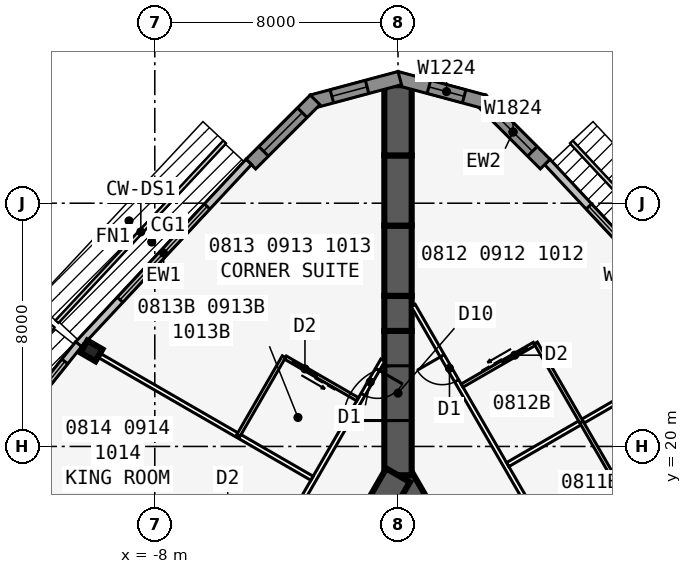
"""IFC4 building model, lengths in metres.
Left out: names, types, materials, properties, quantities, classifications, styles, units other than length and angle.
Written with IfcOpenShell. Run it as: python <this file> out.ifc"""

import sys

from ifc_helpers import new_model, si_unit, direction, frame, frame_2d, origin, origin_2d, place, context, subcontext, project, spatial, polyline, rectangle, i_section, outline, extrude, element, fill, save


model = new_model("IFC4")
c1 = context("Model", 3, precision=1e-05, world=origin(), true_north=direction((0.0, 1.0)))
c2 = subcontext(c1, "Body", "Model", "MODEL_VIEW")
j1 = project(units=[si_unit("LENGTHUNIT", "METRE"), si_unit("PLANEANGLEUNIT", "RADIAN")], contexts=[c1])
p1 = place(None, origin())
s1 = spatial("IfcSite", under=j1, at=p1, CompositionType="ELEMENT")
p2 = place(p1, origin())
s2 = spatial("IfcBuilding", under=s1, at=p2, CompositionType="ELEMENT")
p3 = place(p2, frame((0.0, 0.0, 38.7)))
s3 = spatial("IfcBuildingStorey", under=s2, at=p3, CompositionType="ELEMENT", Elevation=38.7)
p4 = place(p3, frame((16.5, -9.526, 0.0), z_axis=(0.0, 0.0, 1.0), x_axis=(-0.499999749417, 0.866025548458, 0.0)))
e1 = element("IfcWall", 1, at=p4, inside=s3, PredefinedType="SHEAR", context=c2, shape_type="SweptSolid", body=[
    extrude(rectangle(XDim=33.0, YDim=0.9, at=frame_2d((16.5, 0.0))), origin(), (0.0, 0.0, 1.0), 3.4),
])
p5 = place(p4, frame((14.15, 0.0, 0.0)))
e2 = element("IfcOpeningElement", 2, at=p5, cuts=e1, PredefinedType="OPENING", context=c2, shape_type="SweptSolid", body=[
    extrude(rectangle(XDim=1.8, YDim=2.13, at=frame_2d((0.9, 1.065))), frame((0.0, 0.46, 0.0), z_axis=(0.0, -1.0, 0.0), x_axis=(1.0, 0.0, 0.0)), (0.0, 0.0, 1.0), 0.92),
])
p6 = place(p4, frame((12.6, 0.0, 0.0)))
e3 = element("IfcOpeningElement", 3, at=p6, cuts=e1, PredefinedType="OPENING", context=c2, shape_type="SweptSolid", body=[
    extrude(rectangle(XDim=1.0, YDim=2.13, at=frame_2d((0.5, 1.065))), frame((0.0, 0.46, 0.0), z_axis=(0.0, -1.0, 0.0), x_axis=(1.0, 0.0, 0.0)), (0.0, 0.0, 1.0), 0.92),
])
p7 = place(p3, frame((0.0, 19.052, 0.0), z_axis=(0.0, 0.0, 1.0), x_axis=(-0.499999749417, -0.866025548458, 0.0)))
e4 = element("IfcWall", 4, at=p7, inside=s3, PredefinedType="SHEAR", context=c2, shape_type="SweptSolid", body=[
    extrude(rectangle(XDim=33.0, YDim=0.9, at=frame_2d((16.5, 0.0))), origin(), (0.0, 0.0, 1.0), 3.4),
])
p8 = place(p7, frame((14.15, 0.0, 0.0)))
e5 = element("IfcOpeningElement", 5, at=p8, cuts=e4, PredefinedType="OPENING", context=c2, shape_type="SweptSolid", body=[
    extrude(rectangle(XDim=1.8, YDim=2.13, at=frame_2d((0.9, 1.065))), frame((0.0, 0.46, 0.0), z_axis=(0.0, -1.0, 0.0), x_axis=(1.0, 0.0, 0.0)), (0.0, 0.0, 1.0), 0.92),
])
p9 = place(p7, frame((12.6, 0.0, 0.0)))
e6 = element("IfcOpeningElement", 6, at=p9, cuts=e4, PredefinedType="OPENING", context=c2, shape_type="SweptSolid", body=[
    extrude(rectangle(XDim=1.0, YDim=2.13, at=frame_2d((0.5, 1.065))), frame((0.0, 0.46, 0.0), z_axis=(0.0, -1.0, 0.0), x_axis=(1.0, 0.0, 0.0)), (0.0, 0.0, 1.0), 0.92),
])
p10 = place(p3, frame((0.0, 19.052, 0.0), z_axis=(0.0, 0.0, 1.0), x_axis=(0.0, 1.0, 0.0)))
e7 = element("IfcWall", 7, at=p10, inside=s3, PredefinedType="SHEAR", context=c2, shape_type="SweptSolid", body=[
    extrude(rectangle(XDim=4.746, YDim=0.9, at=frame_2d((2.373, 0.0))), origin(), (0.0, 0.0, 1.0), 3.4),
])
p11 = place(p10, frame((1.8, 0.0, 0.0)))
e8 = element("IfcOpeningElement", 8, at=p11, cuts=e7, PredefinedType="OPENING", context=c2, shape_type="SweptSolid", body=[
    extrude(rectangle(XDim=1.8, YDim=2.13, at=frame_2d((0.9, 1.065))), frame((0.0, 0.46, 0.0), z_axis=(0.0, -1.0, 0.0), x_axis=(1.0, 0.0, 0.0)), (0.0, 0.0, 1.0), 0.92),
])
p12 = place(p3, frame((0.0, 23.799, 0.0), z_axis=(0.0, 0.0, 1.0), x_axis=(0.0, 1.0, 0.0)))
e9 = element("IfcWall", 9, at=p12, inside=s3, PredefinedType="SHEAR", context=c2, shape_type="SweptSolid", body=[
    extrude(rectangle(XDim=1.155, YDim=0.9, at=frame_2d((0.577, 0.0))), origin(), (0.0, 0.0, 1.0), 3.4),
])
p13 = place(p3, frame((0.0, 24.953, 0.0), z_axis=(0.0, 0.0, 1.0), x_axis=(0.0, 1.0, 0.0)))
e10 = element("IfcWall", 10, at=p13, inside=s3, PredefinedType="SHEAR", context=c2, shape_type="SweptSolid", body=[
    extrude(rectangle(XDim=2.309, YDim=0.9, at=frame_2d((1.155, 0.0))), origin(), (0.0, 0.0, 1.0), 3.4),
])
p14 = place(p3, frame((0.0, 27.263, 0.0), z_axis=(0.0, 0.0, 1.0), x_axis=(0.0, 1.0, 0.0)))
e11 = element("IfcWall", 11, at=p14, inside=s3, PredefinedType="SHEAR", context=c2, shape_type="SweptSolid", body=[
    extrude(rectangle(XDim=2.31, YDim=0.9, at=frame_2d((1.155, 0.0))), origin(), (0.0, 0.0, 1.0), 3.4),
])
p15 = place(p3, frame((0.0, 29.572, 0.0), z_axis=(0.0, 0.0, 1.0), x_axis=(0.0, 1.0, 0.0)))
e12 = element("IfcWall", 12, at=p15, inside=s3, PredefinedType="SHEAR", context=c2, shape_type="SweptSolid", body=[
    extrude(rectangle(XDim=2.309, YDim=0.9, at=frame_2d((1.155, 0.0))), origin(), (0.0, 0.0, 1.0), 3.4),
])
p16 = place(p3, frame((-10.083, 23.142, 0.0), z_axis=(0.0, 0.0, 1.0), x_axis=(-0.5, -0.866025403784, 0.0)))
e13 = element("IfcColumn", 13, at=p16, inside=s3, PredefinedType="COLUMN", context=c2, shape_type="SweptSolid", body=[
    extrude(i_section(OverallWidth=0.455, OverallDepth=0.569, WebThickness=0.078, FlangeThickness=0.125, at=origin_2d()), origin(), (0.0, 0.0, 1.0), 3.4),
])
p17 = place(p3, frame((10.511, 23.357, 0.0), z_axis=(0.0, 0.0, 1.0), x_axis=(-0.682289646561, 0.731081964075, 0.0)))
e14 = element("IfcWall", 14, at=p17, inside=s3, PredefinedType="STANDARD", context=c2, shape_type="SweptSolid", body=[
    extrude(rectangle(XDim=8.211, YDim=0.25, at=frame_2d((4.105, 0.0))), origin(), (0.0, 0.0, 1.0), 3.235),
])
p18 = place(p17, frame((2.006, 0.0, 0.45)))
e15 = element("IfcOpeningElement", 15, at=p18, cuts=e14, PredefinedType="OPENING", context=c2, shape_type="SweptSolid", body=[
    extrude(rectangle(XDim=4.2, YDim=2.4, at=frame_2d((2.1, 1.2))), frame((0.0, 0.135, 0.0), z_axis=(0.0, -1.0, 0.0), x_axis=(1.0, 0.0, 0.0)), (0.0, 0.0, 1.0), 0.27),
])
p19 = place(p3, frame((4.841, 29.286, 0.0), z_axis=(0.0, 0.0, 1.0), x_axis=(-0.707106781187, 0.707106781187, 0.0)))
e16 = element("IfcWall", 16, at=p19, inside=s3, PredefinedType="SOLIDWALL", context=c2, shape_type="SweptSolid", body=[
    extrude(rectangle(XDim=2.988, YDim=0.45, at=frame_2d((1.494, 0.0))), origin(), (0.0, 0.0, 1.0), 3.235),
])
p20 = place(p19, frame((0.594, 0.0, 0.45)))
e17 = element("IfcOpeningElement", 17, at=p20, cuts=e16, PredefinedType="OPENING", context=c2, shape_type="SweptSolid", body=[
    extrude(rectangle(XDim=1.8, YDim=2.4, at=frame_2d((0.9, 1.2))), frame((0.0, 0.235, 0.0), z_axis=(0.0, -1.0, 0.0), x_axis=(1.0, 0.0, 0.0)), (0.0, 0.0, 1.0), 0.47),
])
p21 = place(p3, frame((2.829, 31.341, 0.0), z_axis=(0.0, 0.0, 1.0), x_axis=(-0.965930548995, 0.258801419081, 0.0)))
e18 = element("IfcWall", 18, at=p21, inside=s3, PredefinedType="SOLIDWALL", context=c2, shape_type="SweptSolid", body=[
    extrude(outline(polyline([(2.989, 0.225), (2.929, 0.225), (2.438, 0.093), (2.402, 0.225), (0.0, 0.225), (0.0, -0.225), (2.989, -0.225), (2.989, 0.225)])), origin(), (0.0, 0.0, 1.0), 3.235),
])
p22 = place(p21, frame((0.676, 0.0, 0.45)))
e19 = element("IfcOpeningElement", 19, at=p22, cuts=e18, PredefinedType="OPENING", context=c2, shape_type="SweptSolid", body=[
    extrude(rectangle(XDim=1.2, YDim=2.4, at=frame_2d((0.6, 1.2))), frame((0.0, 0.235, 0.0), z_axis=(0.0, -1.0, 0.0), x_axis=(1.0, 0.0, 0.0)), (0.0, 0.0, 1.0), 0.47),
])
p23 = place(p3, frame((0.058, 32.114, 0.0), z_axis=(0.0, 0.0, 1.0), x_axis=(-0.965930548995, -0.258801419081, 0.0)))
e20 = element("IfcWall", 20, at=p23, inside=s3, PredefinedType="SOLIDWALL", context=c2, shape_type="SweptSolid", body=[
    extrude(outline(polyline([(2.989, 0.225), (0.586, 0.225), (0.551, 0.093), (0.059, 0.225), (0.0, 0.225), (0.0, -0.225), (2.989, -0.225), (2.989, 0.225)])), origin(), (0.0, 0.0, 1.0), 3.235),
])
p24 = place(p23, frame((1.113, 0.0, 0.45)))
e21 = element("IfcOpeningElement", 21, at=p24, cuts=e20, PredefinedType="OPENING", context=c2, shape_type="SweptSolid", body=[
    extrude(rectangle(XDim=1.2, YDim=2.4, at=frame_2d((0.6, 1.2))), frame((0.0, 0.235, 0.0), z_axis=(0.0, -1.0, 0.0), x_axis=(1.0, 0.0, 0.0)), (0.0, 0.0, 1.0), 0.47),
])
p25 = place(p3, frame((-2.728, 31.399, 0.0), z_axis=(0.0, 0.0, 1.0), x_axis=(-0.707106781187, -0.707106781187, 0.0)))
e22 = element("IfcWall", 22, at=p25, inside=s3, PredefinedType="SOLIDWALL", context=c2, shape_type="SweptSolid", body=[
    extrude(rectangle(XDim=2.988, YDim=0.45, at=frame_2d((1.494, 0.0))), origin(), (0.0, 0.0, 1.0), 3.235),
])
p26 = place(p25, frame((0.594, 0.0, 0.45)))
e23 = element("IfcOpeningElement", 23, at=p26, cuts=e22, PredefinedType="OPENING", context=c2, shape_type="SweptSolid", body=[
    extrude(rectangle(XDim=1.8, YDim=2.4, at=frame_2d((0.9, 1.2))), frame((0.0, 0.235, 0.0), z_axis=(0.0, -1.0, 0.0), x_axis=(1.0, 0.0, 0.0)), (0.0, 0.0, 1.0), 0.47),
])
p27 = place(p3, frame((-4.909, 29.36, 0.0), z_axis=(0.0, 0.0, 1.0), x_axis=(-0.682289646561, -0.731081964075, 0.0)))
e24 = element("IfcWall", 24, at=p27, inside=s3, PredefinedType="STANDARD", context=c2, shape_type="SweptSolid", body=[
    extrude(rectangle(XDim=8.211, YDim=0.25, at=frame_2d((4.105, 0.0))), origin(), (0.0, 0.0, 1.0), 3.235),
])
p28 = place(p27, frame((2.006, 0.0, 0.45)))
e25 = element("IfcOpeningElement", 25, at=p28, cuts=e24, PredefinedType="OPENING", context=c2, shape_type="SweptSolid", body=[
    extrude(rectangle(XDim=4.2, YDim=2.4, at=frame_2d((2.1, 1.2))), frame((0.0, 0.135, 0.0), z_axis=(0.0, -1.0, 0.0), x_axis=(1.0, 0.0, 0.0)), (0.0, 0.0, 1.0), 0.27),
])
p29 = place(p3, frame((-10.505, 23.364, 0.0), z_axis=(0.0, 0.0, 1.0), x_axis=(-0.624594965756, -0.780948864364, 0.0)))
e26 = element("IfcWall", 26, at=p29, inside=s3, PredefinedType="STANDARD", context=c2, shape_type="SweptSolid", body=[
    extrude(rectangle(XDim=5.058, YDim=0.25, at=frame_2d((2.529, 0.0))), origin(), (0.0, 0.0, 1.0), 3.235),
])
p30 = place(p29, frame((0.729, 0.0, 0.45)))
e27 = element("IfcOpeningElement", 27, at=p30, cuts=e26, PredefinedType="OPENING", context=c2, shape_type="SweptSolid", body=[
    extrude(rectangle(XDim=3.6, YDim=2.4, at=frame_2d((1.8, 1.2))), frame((0.0, 0.135, 0.0), z_axis=(0.0, -1.0, 0.0), x_axis=(1.0, 0.0, 0.0)), (0.0, 0.0, 1.0), 0.27),
])
p31 = place(p3, frame((21.586, -11.885, 0.0), z_axis=(0.0, 0.0, 1.0), x_axis=(-0.500001915564, 0.86602429783, 0.0)))
e28 = element("IfcWall", 28, at=p31, inside=s3, PredefinedType="PARTITIONING", context=c2, shape_type="SweptSolid", body=[
    extrude(rectangle(XDim=42.172, YDim=0.15, at=frame_2d((21.086, 0.0))), origin(), (0.0, 0.0, 1.0), 3.235),
])
p32 = place(p31, frame((1.911, 0.0, 0.0)))
e29 = element("IfcOpeningElement", 29, at=p32, cuts=e28, PredefinedType="OPENING", context=c2, shape_type="SweptSolid", body=[
    extrude(rectangle(XDim=0.95, YDim=2.13, at=frame_2d((0.475, 1.065))), frame((0.0, 0.085, 0.0), z_axis=(0.0, -1.0, 0.0), x_axis=(1.0, 0.0, 0.0)), (0.0, 0.0, 1.0), 0.17),
])
p33 = place(p31, frame((7.511, 0.0, 0.0)))
e30 = element("IfcOpeningElement", 30, at=p33, cuts=e28, PredefinedType="OPENING", context=c2, shape_type="SweptSolid", body=[
    extrude(rectangle(XDim=0.95, YDim=2.13, at=frame_2d((0.475, 1.065))), frame((0.0, 0.085, 0.0), z_axis=(0.0, -1.0, 0.0), x_axis=(1.0, 0.0, 0.0)), (0.0, 0.0, 1.0), 0.17),
])
p34 = place(p31, frame((13.711, 0.0, 0.0)))
e31 = element("IfcOpeningElement", 31, at=p34, cuts=e28, PredefinedType="OPENING", context=c2, shape_type="SweptSolid", body=[
    extrude(rectangle(XDim=0.95, YDim=2.13, at=frame_2d((0.475, 1.065))), frame((0.0, 0.085, 0.0), z_axis=(0.0, -1.0, 0.0), x_axis=(1.0, 0.0, 0.0)), (0.0, 0.0, 1.0), 0.17),
])
p35 = place(p31, frame((21.911, 0.0, 0.0)))
e32 = element("IfcOpeningElement", 32, at=p35, cuts=e28, PredefinedType="OPENING", context=c2, shape_type="SweptSolid", body=[
    extrude(rectangle(XDim=0.95, YDim=2.13, at=frame_2d((0.475, 1.065))), frame((0.0, 0.085, 0.0), z_axis=(0.0, -1.0, 0.0), x_axis=(1.0, 0.0, 0.0)), (0.0, 0.0, 1.0), 0.17),
])
p36 = place(p31, frame((28.711, 0.0, 0.0)))
e33 = element("IfcOpeningElement", 33, at=p36, cuts=e28, PredefinedType="OPENING", context=c2, shape_type="SweptSolid", body=[
    extrude(rectangle(XDim=0.95, YDim=2.13, at=frame_2d((0.475, 1.065))), frame((0.0, 0.085, 0.0), z_axis=(0.0, -1.0, 0.0), x_axis=(1.0, 0.0, 0.0)), (0.0, 0.0, 1.0), 0.17),
])
p37 = place(p31, frame((31.911, 0.0, 0.0)))
e34 = element("IfcOpeningElement", 34, at=p37, cuts=e28, PredefinedType="OPENING", context=c2, shape_type="SweptSolid", body=[
    extrude(rectangle(XDim=0.95, YDim=2.13, at=frame_2d((0.475, 1.065))), frame((0.0, 0.085, 0.0), z_axis=(0.0, -1.0, 0.0), x_axis=(1.0, 0.0, 0.0)), (0.0, 0.0, 1.0), 0.17),
])
p38 = place(p31, frame((39.311, 0.0, 0.0)))
e35 = element("IfcOpeningElement", 35, at=p38, cuts=e28, PredefinedType="OPENING", context=c2, shape_type="SweptSolid", body=[
    extrude(rectangle(XDim=0.95, YDim=2.13, at=frame_2d((0.475, 1.065))), frame((0.0, 0.085, 0.0), z_axis=(0.0, -1.0, 0.0), x_axis=(1.0, 0.0, 0.0)), (0.0, 0.0, 1.0), 0.17),
])
p39 = place(p3, frame((6.108, 15.073, 0.0), z_axis=(0.0, 0.0, 1.0), x_axis=(0.866031196456, 0.499989966665, 0.0)))
e36 = element("IfcWall", 36, at=p39, inside=s3, PredefinedType="PARTITIONING", context=c2, shape_type="SweptSolid", body=[
    extrude(rectangle(XDim=8.585, YDim=0.15, at=frame_2d((4.292, 0.0))), origin(), (0.0, 0.0, 1.0), 2.389),
])
p40 = place(p3, frame((3.608, 19.404, 0.0), z_axis=(0.0, 0.0, 1.0), x_axis=(0.866021300503, 0.500007107024, 0.0)))
e37 = element("IfcWall", 37, at=p40, inside=s3, PredefinedType="PARTITIONING", context=c2, shape_type="SweptSolid", body=[
    extrude(rectangle(XDim=7.82, YDim=0.15, at=frame_2d((3.91, 0.0))), origin(), (0.0, 0.0, 1.0), 2.389),
])
for number, where, z_axis, x_axis in (
    (38, (7.533, 18.205, 0.0), (0.0, 0.0, 1.0), (-0.5, 0.866, 0.0)),
    (39, (6.033, 20.803, 0.0), (0.0, 0.0, 1.0), (-0.5, 0.866, 0.0)),
):
    element("IfcWall", number, at=place(p3, frame(where, z_axis=z_axis, x_axis=x_axis)), inside=s3, PredefinedType="PLUMBINGWALL", context=c2, shape_type="SweptSolid", body=[
        extrude(rectangle(XDim=3.0, YDim=0.12, at=frame_2d((1.5, 0.0))), origin(), (0.0, 0.0, 1.0), 3.235),
    ])
p41 = place(p3, frame((2.108, 22.002, 0.0), z_axis=(0.0, 0.0, 1.0), x_axis=(0.866035715982, 0.499982138324, 0.0)))
e40 = element("IfcWall", 40, at=p41, inside=s3, PredefinedType="PLUMBINGWALL", context=c2, shape_type="SweptSolid", body=[
    extrude(rectangle(XDim=2.74, YDim=0.12, at=frame_2d((1.37, 0.0))), origin(), (0.0, 0.0, 1.0), 3.235),
])
p42 = place(p41, frame((1.55, 0.0, 0.0)))
e41 = element("IfcOpeningElement", 41, at=p42, cuts=e40, PredefinedType="OPENING", context=c2, shape_type="SweptSolid", body=[
    extrude(rectangle(XDim=0.9, YDim=2.13, at=frame_2d((0.45, 1.065))), frame((0.0, 0.07, 0.0), z_axis=(0.0, -1.0, 0.0), x_axis=(1.0, 0.0, 0.0)), (0.0, 0.0, 1.0), 0.14),
])
p43 = place(p3, frame((-0.5, 22.836, 0.0), z_axis=(0.0, 0.0, 1.0), x_axis=(-0.500001677587, -0.866024435227, 0.0)))
e42 = element("IfcWall", 42, at=p43, inside=s3, PredefinedType="PARTITIONING", context=c2, shape_type="SweptSolid", body=[
    extrude(rectangle(XDim=39.054, YDim=0.15, at=frame_2d((19.527, 0.0))), origin(), (0.0, 0.0, 1.0), 3.235),
])
p44 = place(p43, frame((0.352, 0.0, 0.0)))
e43 = element("IfcOpeningElement", 43, at=p44, cuts=e42, PredefinedType="OPENING", context=c2, shape_type="SweptSolid", body=[
    extrude(rectangle(XDim=0.95, YDim=2.13, at=frame_2d((0.475, 1.065))), frame((0.0, 0.085, 0.0), z_axis=(0.0, -1.0, 0.0), x_axis=(1.0, 0.0, 0.0)), (0.0, 0.0, 1.0), 0.17),
])
p45 = place(p43, frame((5.952, 0.0, 0.0)))
e44 = element("IfcOpeningElement", 44, at=p45, cuts=e42, PredefinedType="OPENING", context=c2, shape_type="SweptSolid", body=[
    extrude(rectangle(XDim=0.95, YDim=2.13, at=frame_2d((0.475, 1.065))), frame((0.0, 0.085, 0.0), z_axis=(0.0, -1.0, 0.0), x_axis=(1.0, 0.0, 0.0)), (0.0, 0.0, 1.0), 0.17),
])
p46 = place(p43, frame((11.552, 0.0, 0.0)))
e45 = element("IfcOpeningElement", 45, at=p46, cuts=e42, PredefinedType="OPENING", context=c2, shape_type="SweptSolid", body=[
    extrude(rectangle(XDim=0.95, YDim=2.13, at=frame_2d((0.475, 1.065))), frame((0.0, 0.085, 0.0), z_axis=(0.0, -1.0, 0.0), x_axis=(1.0, 0.0, 0.0)), (0.0, 0.0, 1.0), 0.17),
])
p47 = place(p43, frame((21.552, 0.0, 0.0)))
e46 = element("IfcOpeningElement", 46, at=p47, cuts=e42, PredefinedType="OPENING", context=c2, shape_type="SweptSolid", body=[
    extrude(rectangle(XDim=0.95, YDim=2.13, at=frame_2d((0.475, 1.065))), frame((0.0, 0.085, 0.0), z_axis=(0.0, -1.0, 0.0), x_axis=(1.0, 0.0, 0.0)), (0.0, 0.0, 1.0), 0.17),
])
p48 = place(p43, frame((30.952, 0.0, 0.0)))
e47 = element("IfcOpeningElement", 47, at=p48, cuts=e42, PredefinedType="OPENING", context=c2, shape_type="SweptSolid", body=[
    extrude(rectangle(XDim=0.95, YDim=2.13, at=frame_2d((0.475, 1.065))), frame((0.0, 0.085, 0.0), z_axis=(0.0, -1.0, 0.0), x_axis=(1.0, 0.0, 0.0)), (0.0, 0.0, 1.0), 0.17),
])
p49 = place(p43, frame((37.752, 0.0, 0.0)))
e48 = element("IfcOpeningElement", 48, at=p49, cuts=e42, PredefinedType="OPENING", context=c2, shape_type="SweptSolid", body=[
    extrude(rectangle(XDim=0.95, YDim=2.13, at=frame_2d((0.475, 1.065))), frame((0.0, 0.085, 0.0), z_axis=(0.0, -1.0, 0.0), x_axis=(1.0, 0.0, 0.0)), (0.0, 0.0, 1.0), 0.17),
])
p50 = place(p3, frame((-2.829, 18.954, 0.0), z_axis=(0.0, 0.0, 1.0), x_axis=(-0.866020536561, 0.500008430184, 0.0)))
e49 = element("IfcWall", 49, at=p50, inside=s3, PredefinedType="PARTITIONING", context=c2, shape_type="SweptSolid", body=[
    extrude(rectangle(XDim=8.72, YDim=0.15, at=frame_2d((4.36, 0.0))), origin(), (0.0, 0.0, 1.0), 2.389),
])
p51 = place(p3, frame((-5.329, 14.623, 0.0), z_axis=(0.0, 0.0, 1.0), x_axis=(-0.866018409083, 0.500012114982, 0.0)))
e50 = element("IfcWall", 50, at=p51, inside=s3, PredefinedType="PARTITIONING", context=c2, shape_type="SweptSolid", body=[
    extrude(rectangle(XDim=9.485, YDim=0.15, at=frame_2d((4.742, 0.0))), origin(), (0.0, 0.0, 1.0), 2.389),
])
p52 = place(p3, frame((-3.753, 22.952, 0.0), z_axis=(0.0, 0.0, 1.0), x_axis=(-0.499990139034, -0.866031096941, 0.0)))
e51 = element("IfcWall", 51, at=p52, inside=s3, PredefinedType="PLUMBINGWALL", context=c2, shape_type="SweptSolid", body=[
    extrude(rectangle(XDim=3.0, YDim=0.12, at=frame_2d((1.5, 0.0))), origin(), (0.0, 0.0, 1.0), 3.235),
])
p53 = place(p3, frame((-1.329, 21.552, 0.0), z_axis=(0.0, 0.0, 1.0), x_axis=(-0.865997131366, 0.500048966069, 0.0)))
e52 = element("IfcWall", 52, at=p53, inside=s3, PredefinedType="PLUMBINGWALL", context=c2, shape_type="SweptSolid", body=[
    extrude(rectangle(XDim=2.74, YDim=0.12, at=frame_2d((1.37, 0.0))), origin(), (0.0, 0.0, 1.0), 3.235),
])
p54 = place(p53, frame((1.55, 0.0, 0.0)))
e53 = element("IfcOpeningElement", 53, at=p54, cuts=e52, PredefinedType="OPENING", context=c2, shape_type="SweptSolid", body=[
    extrude(rectangle(XDim=0.9, YDim=2.13, at=frame_2d((0.45, 1.065))), frame((0.0, 0.07, 0.0), z_axis=(0.0, -1.0, 0.0), x_axis=(1.0, 0.0, 0.0)), (0.0, 0.0, 1.0), 0.14),
])
p55 = place(p18, origin())
e54 = element("IfcWindow", 54, at=p55, inside=s3, PartitioningType="SINGLE_PANEL", PredefinedType="WINDOW", context=c2, shape_type="SweptSolid", body=[
    extrude(rectangle(XDim=4.2, YDim=2.4, at=frame_2d((2.1, 1.2))), frame((0.0, 0.03, 0.0), z_axis=(0.0, -1.0, 0.0), x_axis=(1.0, 0.0, 0.0)), (0.0, 0.0, 1.0), 0.06),
])
fill(e15, e54)
p56 = place(p20, origin())
e55 = element("IfcWindow", 55, at=p56, inside=s3, PartitioningType="SINGLE_PANEL", PredefinedType="WINDOW", context=c2, shape_type="SweptSolid", body=[
    extrude(rectangle(XDim=1.8, YDim=2.4, at=frame_2d((0.9, 1.2))), frame((0.0, 0.03, 0.0), z_axis=(0.0, -1.0, 0.0), x_axis=(1.0, 0.0, 0.0)), (0.0, 0.0, 1.0), 0.06),
])
fill(e17, e55)
p57 = place(p22, origin())
e56 = element("IfcWindow", 56, at=p57, inside=s3, PartitioningType="SINGLE_PANEL", PredefinedType="WINDOW", context=c2, shape_type="SweptSolid", body=[
    extrude(rectangle(XDim=1.2, YDim=2.4, at=frame_2d((0.6, 1.2))), frame((0.0, 0.03, 0.0), z_axis=(0.0, -1.0, 0.0), x_axis=(1.0, 0.0, 0.0)), (0.0, 0.0, 1.0), 0.06),
])
fill(e19, e56)
p58 = place(p24, origin())
e57 = element("IfcWindow", 57, at=p58, inside=s3, PartitioningType="SINGLE_PANEL", PredefinedType="WINDOW", context=c2, shape_type="SweptSolid", body=[
    extrude(rectangle(XDim=1.2, YDim=2.4, at=frame_2d((0.6, 1.2))), frame((0.0, 0.03, 0.0), z_axis=(0.0, -1.0, 0.0), x_axis=(1.0, 0.0, 0.0)), (0.0, 0.0, 1.0), 0.06),
])
fill(e21, e57)
p59 = place(p26, origin())
e58 = element("IfcWindow", 58, at=p59, inside=s3, PartitioningType="SINGLE_PANEL", PredefinedType="WINDOW", context=c2, shape_type="SweptSolid", body=[
    extrude(rectangle(XDim=1.8, YDim=2.4, at=frame_2d((0.9, 1.2))), frame((0.0, 0.03, 0.0), z_axis=(0.0, -1.0, 0.0), x_axis=(1.0, 0.0, 0.0)), (0.0, 0.0, 1.0), 0.06),
])
fill(e23, e58)
p60 = place(p28, origin())
e59 = element("IfcWindow", 59, at=p60, inside=s3, PartitioningType="SINGLE_PANEL", PredefinedType="WINDOW", context=c2, shape_type="SweptSolid", body=[
    extrude(rectangle(XDim=4.2, YDim=2.4, at=frame_2d((2.1, 1.2))), frame((0.0, 0.03, 0.0), z_axis=(0.0, -1.0, 0.0), x_axis=(1.0, 0.0, 0.0)), (0.0, 0.0, 1.0), 0.06),
])
fill(e25, e59)
p61 = place(p30, origin())
e60 = element("IfcWindow", 60, at=p61, inside=s3, PartitioningType="SINGLE_PANEL", PredefinedType="WINDOW", context=c2, shape_type="SweptSolid", body=[
    extrude(rectangle(XDim=3.6, YDim=2.4, at=frame_2d((1.8, 1.2))), frame((0.0, 0.03, 0.0), z_axis=(0.0, -1.0, 0.0), x_axis=(1.0, 0.0, 0.0)), (0.0, 0.0, 1.0), 0.06),
])
fill(e27, e60)
p62 = place(p42, origin())
e61 = element("IfcDoor", 61, at=p62, inside=s3, OperationType="SLIDING_TO_LEFT", PredefinedType="DOOR", context=c2, shape_type="SweptSolid", body=[
    extrude(rectangle(XDim=0.9, YDim=2.13, at=frame_2d((0.45, 1.065))), frame((0.0, 0.025, 0.0), z_axis=(0.0, -1.0, 0.0), x_axis=(1.0, 0.0, 0.0)), (0.0, 0.0, 1.0), 0.05),
])
fill(e41, e61)
p63 = place(p38, origin())
e62 = element("IfcDoor", 62, at=p63, inside=s3, OperationType="SINGLE_SWING_RIGHT", PredefinedType="DOOR", context=c2, shape_type="SweptSolid", body=[
    extrude(rectangle(XDim=0.95, YDim=2.13, at=frame_2d((0.475, 1.065))), frame((0.0, 0.025, 0.0), z_axis=(0.0, -1.0, 0.0), x_axis=(1.0, 0.0, 0.0)), (0.0, 0.0, 1.0), 0.05),
])
fill(e35, e62)
p64 = place(p54, origin())
e63 = element("IfcDoor", 63, at=p64, inside=s3, OperationType="SLIDING_TO_LEFT", PredefinedType="DOOR", context=c2, shape_type="SweptSolid", body=[
    extrude(rectangle(XDim=0.9, YDim=2.13, at=frame_2d((0.45, 1.065))), frame((0.0, 0.025, 0.0), z_axis=(0.0, -1.0, 0.0), x_axis=(1.0, 0.0, 0.0)), (0.0, 0.0, 1.0), 0.05),
])
fill(e53, e63)
p65 = place(p44, origin())
e64 = element("IfcDoor", 64, at=p65, inside=s3, OperationType="SINGLE_SWING_LEFT", PredefinedType="DOOR", context=c2, shape_type="SweptSolid", body=[
    extrude(rectangle(XDim=0.95, YDim=2.13, at=frame_2d((0.475, 1.065))), frame((0.0, 0.025, 0.0), z_axis=(0.0, -1.0, 0.0), x_axis=(1.0, 0.0, 0.0)), (0.0, 0.0, 1.0), 0.05),
])
fill(e43, e64)
p66 = place(p11, origin())
e65 = element("IfcDoor", 65, at=p66, inside=s3, OperationType="DOUBLE_DOOR_DOUBLE_SWING", PredefinedType="DOOR", context=c2, shape_type="SweptSolid", body=[
    extrude(rectangle(XDim=1.8, YDim=2.13, at=frame_2d((0.9, 1.065))), frame((0.0, 0.025, 0.0), z_axis=(0.0, -1.0, 0.0), x_axis=(1.0, 0.0, 0.0)), (0.0, 0.0, 1.0), 0.05),
])
fill(e8, e65)
save(model, sys.argv[1])
